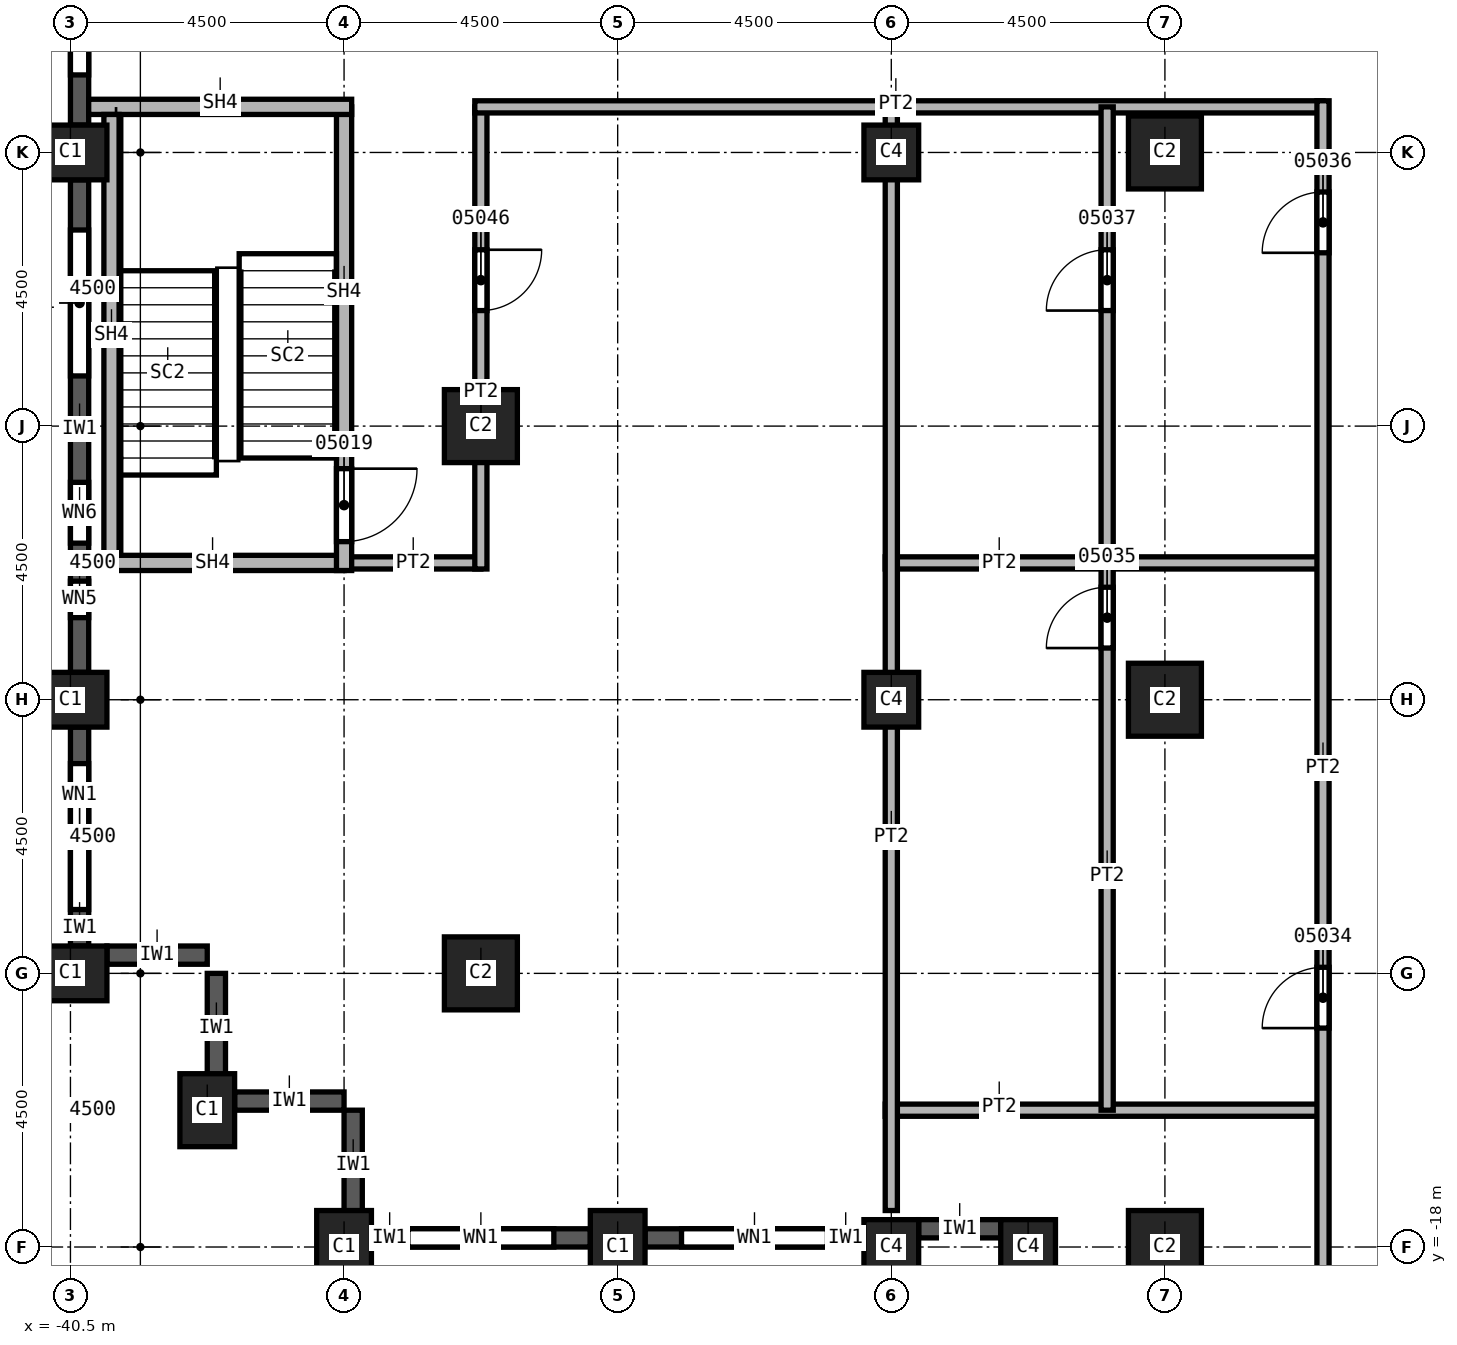
"""IFC4 building model, lengths in metres.
Left out: names, types, materials, properties, quantities, classifications, styles, units other than length and angle.
Written with IfcOpenShell. Run it as: python <this file> out.ifc"""

import sys

from ifc_helpers import new_model, si_unit, direction, frame, frame_2d, origin, origin_2d, place, context, subcontext, project, spatial, rectangle, extrude, element, fill, save


model = new_model("IFC4")
c1 = context("Model", 3, precision=1e-05, world=origin(), true_north=direction((0.0, 1.0)))
c2 = subcontext(c1, "Body", "Model", "MODEL_VIEW")
j1 = project(units=[si_unit("LENGTHUNIT", "METRE"), si_unit("PLANEANGLEUNIT", "RADIAN")], contexts=[c1])
p1 = place(None, origin())
s1 = spatial("IfcSite", under=j1, at=p1, CompositionType="ELEMENT")
p2 = place(p1, origin())
s2 = spatial("IfcBuilding", under=s1, at=p2, CompositionType="ELEMENT")
p3 = place(p2, frame((0.0, 0.0, 116.0)))
s3 = spatial("IfcBuildingStorey", under=s2, at=p3, CompositionType="ELEMENT", Elevation=116.0)
for number, where, z_axis, x_axis in (
    (1, (-40.5, 0.0, 0.0), (0.0, 0.0, 1.0), (0.0, 1.0, 0.0)),
    (2, (-40.5, -9.0, 0.0), (0.0, 0.0, 1.0), (0.0, 1.0, 0.0)),
    (3, (-40.5, -13.5, 0.0), (0.0, 0.0, 1.0), (0.0, 1.0, 0.0)),
    (4, (-38.25, -15.75, 0.0), (0.0, 0.0, 1.0), (1.0, 0.0, 0.0)),
    (5, (-31.5, -18.0, 0.0), (0.0, 0.0, 1.0), (1.0, 0.0, 0.0)),
    (6, (-36.0, -18.0, 0.0), (0.0, 0.0, 1.0), (1.0, 0.0, 0.0)),
):
    element("IfcColumn", number, at=place(p3, frame(where, z_axis=z_axis, x_axis=x_axis)), inside=s3, PredefinedType="COLUMN", context=c2, shape_type="SweptSolid", body=[
        extrude(rectangle(XDim=0.9, YDim=1.2, at=origin_2d()), origin(), (0.0, 0.0, 1.0), 3.6),
    ])
for number, where, z_axis, x_axis in (
    (7, (-33.75, -4.5, 0.0), (0.0, 0.0, 1.0), (1.0, 0.0, 0.0)),
    (8, (-33.75, -13.5, 0.0), (0.0, 0.0, 1.0), (1.0, 0.0, 0.0)),
    (9, (-22.5, 0.0, 0.0), (0.0, 0.0, 1.0), (1.0, 0.0, 0.0)),
    (10, (-22.5, -9.0, 0.0), (0.0, 0.0, 1.0), (1.0, 0.0, 0.0)),
    (11, (-22.5, -18.0, 0.0), (0.0, 0.0, 1.0), (1.0, 0.0, 0.0)),
):
    element("IfcColumn", number, at=place(p3, frame(where, z_axis=z_axis, x_axis=x_axis)), inside=s3, PredefinedType="COLUMN", context=c2, shape_type="SweptSolid", body=[
        extrude(rectangle(XDim=1.2, YDim=1.2, at=origin_2d()), origin(), (0.0, 0.0, 1.0), 3.6),
    ])
for number, where, z_axis, x_axis in (
    (12, (-27.0, 0.0, 0.0), (0.0, 0.0, 1.0), (1.0, 0.0, 0.0)),
    (13, (-27.0, -9.0, 0.0), (0.0, 0.0, 1.0), (1.0, 0.0, 0.0)),
    (14, (-27.0, -18.0, 0.0), (0.0, 0.0, 1.0), (1.0, 0.0, 0.0)),
    (15, (-24.75, -18.0, 0.0), (0.0, 0.0, 1.0), (1.0, 0.0, 0.0)),
):
    element("IfcColumn", number, at=place(p3, frame(where, z_axis=z_axis, x_axis=x_axis)), inside=s3, PredefinedType="COLUMN", context=c2, shape_type="SweptSolid", body=[
        extrude(rectangle(XDim=0.9, YDim=0.9, at=origin_2d()), origin(), (0.0, 0.0, 1.0), 3.6),
    ])
p4 = place(p3, frame((-39.9, -13.2, 0.0), z_axis=(0.0, 0.0, 1.0), x_axis=(1.0, 0.0, 0.0)))
e16 = element("IfcWall", 16, at=p4, inside=s3, PredefinedType="SOLIDWALL", context=c2, shape_type="SweptSolid", body=[
    extrude(rectangle(XDim=1.65, YDim=0.3, at=frame_2d((0.825, 0.0))), origin(), (0.0, 0.0, 1.0), 3.0),
])
for number, where, z_axis, x_axis in (
    (17, (-38.1, -15.3, 0.0), (0.0, 0.0, 1.0), (0.0, 1.0, 0.0)),
    (18, (-37.8, -15.6, 0.0), (0.0, 0.0, 1.0), (1.0, 0.0, 0.0)),
    (19, (-35.85, -17.55, 0.0), (0.0, 0.0, 1.0), (0.0, 1.0, 0.0)),
):
    element("IfcWall", number, at=place(p3, frame(where, z_axis=z_axis, x_axis=x_axis)), inside=s3, PredefinedType="SOLIDWALL", context=c2, shape_type="SweptSolid", body=[
        extrude(rectangle(XDim=1.8, YDim=0.3, at=frame_2d((0.9, 0.0))), origin(), (0.0, 0.0, 1.0), 3.0),
    ])
p5 = place(p3, frame((-40.35, 8.55, 0.0), z_axis=(0.0, 0.0, 1.0), x_axis=(0.0, -1.0, 0.0)))
e20 = element("IfcWall", 20, at=p5, inside=s3, PredefinedType="SOLIDWALL", context=c2, shape_type="SweptSolid", body=[
    extrude(rectangle(XDim=8.1, YDim=0.3, at=frame_2d((4.05, 0.0))), origin(), (0.0, 0.0, 1.0), 3.0),
])
p6 = place(p5, frame((0.825, 0.0, 0.8)))
e21 = element("IfcOpeningElement", 21, at=p6, cuts=e20, PredefinedType="OPENING", context=c2, shape_type="SweptSolid", body=[
    extrude(rectangle(XDim=2.4, YDim=1.95, at=frame_2d((1.2, 0.975))), frame((0.0, 0.15, 0.0), z_axis=(0.0, -1.0, 0.0), x_axis=(1.0, 0.0, 0.0)), (0.0, 0.0, 1.0), 0.3),
])
p7 = place(p5, frame((4.875, 0.0, 0.8)))
e22 = element("IfcOpeningElement", 22, at=p7, cuts=e20, PredefinedType="OPENING", context=c2, shape_type="SweptSolid", body=[
    extrude(rectangle(XDim=2.4, YDim=1.95, at=frame_2d((1.2, 0.975))), frame((0.0, 0.15, 0.0), z_axis=(0.0, -1.0, 0.0), x_axis=(1.0, 0.0, 0.0)), (0.0, 0.0, 1.0), 0.3),
])
p8 = place(p3, frame((-40.35, -0.45, 0.0), z_axis=(0.0, 0.0, 1.0), x_axis=(0.0, -1.0, 0.0)))
e23 = element("IfcWall", 23, at=p8, inside=s3, PredefinedType="SOLIDWALL", context=c2, shape_type="SweptSolid", body=[
    extrude(rectangle(XDim=8.1, YDim=0.3, at=frame_2d((4.05, 0.0))), origin(), (0.0, 0.0, 1.0), 3.0),
])
p9 = place(p8, frame((0.825, 0.0, 0.8)))
e24 = element("IfcOpeningElement", 24, at=p9, cuts=e23, PredefinedType="OPENING", context=c2, shape_type="SweptSolid", body=[
    extrude(rectangle(XDim=2.4, YDim=1.95, at=frame_2d((1.2, 0.975))), frame((0.0, 0.15, 0.0), z_axis=(0.0, -1.0, 0.0), x_axis=(1.0, 0.0, 0.0)), (0.0, 0.0, 1.0), 0.3),
])
p10 = place(p8, frame((4.975, 0.0, 0.8)))
e25 = element("IfcOpeningElement", 25, at=p10, cuts=e23, PredefinedType="OPENING", context=c2, shape_type="SweptSolid", body=[
    extrude(rectangle(XDim=1.0, YDim=1.95, at=frame_2d((0.5, 0.975))), frame((0.0, 0.15, 0.0), z_axis=(0.0, -1.0, 0.0), x_axis=(1.0, 0.0, 0.0)), (0.0, 0.0, 1.0), 0.3),
])
p11 = place(p8, frame((6.6, 0.0, 0.8)))
e26 = element("IfcOpeningElement", 26, at=p11, cuts=e23, PredefinedType="OPENING", context=c2, shape_type="SweptSolid", body=[
    extrude(rectangle(XDim=0.6, YDim=1.95, at=frame_2d((0.3, 0.975))), frame((0.0, 0.15, 0.0), z_axis=(0.0, -1.0, 0.0), x_axis=(1.0, 0.0, 0.0)), (0.0, 0.0, 1.0), 0.3),
])
p12 = place(p3, frame((-40.35, -9.45, 0.0), z_axis=(0.0, 0.0, 1.0), x_axis=(0.0, -1.0, 0.0)))
e27 = element("IfcWall", 27, at=p12, inside=s3, PredefinedType="SOLIDWALL", context=c2, shape_type="SweptSolid", body=[
    extrude(rectangle(XDim=3.6, YDim=0.3, at=frame_2d((1.8, 0.0))), origin(), (0.0, 0.0, 1.0), 3.0),
])
p13 = place(p12, frame((0.6, 0.0, 0.8)))
e28 = element("IfcOpeningElement", 28, at=p13, cuts=e27, PredefinedType="OPENING", context=c2, shape_type="SweptSolid", body=[
    extrude(rectangle(XDim=2.4, YDim=1.95, at=frame_2d((1.2, 0.975))), frame((0.0, 0.15, 0.0), z_axis=(0.0, -1.0, 0.0), x_axis=(1.0, 0.0, 0.0)), (0.0, 0.0, 1.0), 0.3),
])
p14 = place(p3, frame((-35.55, -17.85, 0.0), z_axis=(0.0, 0.0, 1.0), x_axis=(1.0, 0.0, 0.0)))
e29 = element("IfcWall", 29, at=p14, inside=s3, PredefinedType="SOLIDWALL", context=c2, shape_type="SweptSolid", body=[
    extrude(rectangle(XDim=3.6, YDim=0.3, at=frame_2d((1.8, 0.0))), origin(), (0.0, 0.0, 1.0), 3.0),
])
p15 = place(p14, frame((0.6, 0.0, 0.8)))
e30 = element("IfcOpeningElement", 30, at=p15, cuts=e29, PredefinedType="OPENING", context=c2, shape_type="SweptSolid", body=[
    extrude(rectangle(XDim=2.4, YDim=1.95, at=frame_2d((1.2, 0.975))), frame((0.0, 0.15, 0.0), z_axis=(0.0, -1.0, 0.0), x_axis=(1.0, 0.0, 0.0)), (0.0, 0.0, 1.0), 0.3),
])
p16 = place(p3, frame((-31.05, -17.85, 0.0), z_axis=(0.0, 0.0, 1.0), x_axis=(1.0, 0.0, 0.0)))
e31 = element("IfcWall", 31, at=p16, inside=s3, PredefinedType="SOLIDWALL", context=c2, shape_type="SweptSolid", body=[
    extrude(rectangle(XDim=3.6, YDim=0.3, at=frame_2d((1.8, 0.0))), origin(), (0.0, 0.0, 1.0), 3.0),
])
p17 = place(p16, frame((0.6, 0.0, 0.8)))
e32 = element("IfcOpeningElement", 32, at=p17, cuts=e31, PredefinedType="OPENING", context=c2, shape_type="SweptSolid", body=[
    extrude(rectangle(XDim=2.4, YDim=1.95, at=frame_2d((1.2, 0.975))), frame((0.0, 0.15, 0.0), z_axis=(0.0, -1.0, 0.0), x_axis=(1.0, 0.0, 0.0)), (0.0, 0.0, 1.0), 0.3),
])
p18 = place(p3, frame((-26.55, -17.7, 0.0), z_axis=(0.0, 0.0, 1.0), x_axis=(1.0, 0.0, 0.0)))
e33 = element("IfcWall", 33, at=p18, inside=s3, PredefinedType="SOLIDWALL", context=c2, shape_type="SweptSolid", body=[
    extrude(rectangle(XDim=1.35, YDim=0.3, at=frame_2d((0.675, 0.0))), origin(), (0.0, 0.0, 1.0), 3.0),
])
p19 = place(p3, frame((-33.75, -6.75, 0.0), z_axis=(0.0, 0.0, 1.0), x_axis=(-1.0, 0.0, 0.0)))
e34 = element("IfcWall", 34, at=p19, inside=s3, PredefinedType="PARTITIONING", context=c2, shape_type="SweptSolid", body=[
    extrude(rectangle(XDim=2.25, YDim=0.2, at=frame_2d((1.125, 0.0))), origin(), (0.0, 0.0, 1.0), 3.6),
])
p20 = place(p3, frame((-33.75, 0.75, 0.0), z_axis=(0.0, 0.0, 1.0), x_axis=(0.0, -1.0, 0.0)))
e35 = element("IfcWall", 35, at=p20, inside=s3, PredefinedType="PARTITIONING", context=c2, shape_type="SweptSolid", body=[
    extrude(rectangle(XDim=7.6, YDim=0.2, at=frame_2d((3.8, 0.0))), origin(), (0.0, 0.0, 1.0), 3.6),
])
p21 = place(p20, frame((2.35, 0.0, 0.0)))
e36 = element("IfcOpeningElement", 36, at=p21, cuts=e35, PredefinedType="OPENING", context=c2, shape_type="SweptSolid", body=[
    extrude(rectangle(XDim=1.0, YDim=2.1, at=frame_2d((0.5, 1.05))), frame((0.0, 0.1, 0.0), z_axis=(0.0, -1.0, 0.0), x_axis=(1.0, 0.0, 0.0)), (0.0, 0.0, 1.0), 0.2),
])
for number, where, z_axis, x_axis in (
    (37, (-27.1, -15.75, 0.0), (0.0, 0.0, 1.0), (1.0, 0.0, 0.0)),
    (38, (-27.1, -6.75, 0.0), (0.0, 0.0, 1.0), (1.0, 0.0, 0.0)),
):
    element("IfcWall", number, at=place(p3, frame(where, z_axis=z_axis, x_axis=x_axis)), inside=s3, PredefinedType="PARTITIONING", context=c2, shape_type="SweptSolid", body=[
        extrude(rectangle(XDim=7.2, YDim=0.2, at=frame_2d((3.6, 0.0))), origin(), (0.0, 0.0, 1.0), 3.6),
    ])
p22 = place(p3, frame((-27.0, -17.4, 0.0), z_axis=(0.0, 0.0, 1.0), x_axis=(0.0, 1.0, 0.0)))
e39 = element("IfcWall", 39, at=p22, inside=s3, PredefinedType="PARTITIONING", context=c2, shape_type="SweptSolid", body=[
    extrude(rectangle(XDim=18.15, YDim=0.2, at=frame_2d((9.075, 0.0))), origin(), (0.0, 0.0, 1.0), 3.6),
])
p23 = place(p3, frame((-19.9, 0.75, 0.0), z_axis=(0.0, 0.0, 1.0), x_axis=(-1.0, 0.0, 0.0)))
e40 = element("IfcWall", 40, at=p23, inside=s3, PredefinedType="PARTITIONING", context=c2, shape_type="SweptSolid", body=[
    extrude(rectangle(XDim=13.95, YDim=0.2, at=frame_2d((6.975, 0.0))), origin(), (0.0, 0.0, 1.0), 3.6),
])
p24 = place(p3, frame((-23.45, -15.75, 0.0), z_axis=(0.0, 0.0, 1.0), x_axis=(0.0, 1.0, 0.0)))
e41 = element("IfcWall", 41, at=p24, inside=s3, PredefinedType="PARTITIONING", context=c2, shape_type="SweptSolid", body=[
    extrude(rectangle(XDim=16.5, YDim=0.2, at=frame_2d((8.25, 0.0))), origin(), (0.0, 0.0, 1.0), 3.6),
])
p25 = place(p24, frame((7.6, 0.0, 0.0)))
e42 = element("IfcOpeningElement", 42, at=p25, cuts=e41, PredefinedType="OPENING", context=c2, shape_type="SweptSolid", body=[
    extrude(rectangle(XDim=1.0, YDim=2.1, at=frame_2d((0.5, 1.05))), frame((0.0, 0.1, 0.0), z_axis=(0.0, -1.0, 0.0), x_axis=(1.0, 0.0, 0.0)), (0.0, 0.0, 1.0), 0.2),
])
p26 = place(p24, frame((13.15, 0.0, 0.0)))
e43 = element("IfcOpeningElement", 43, at=p26, cuts=e41, PredefinedType="OPENING", context=c2, shape_type="SweptSolid", body=[
    extrude(rectangle(XDim=1.0, YDim=2.1, at=frame_2d((0.5, 1.05))), frame((0.0, 0.1, 0.0), z_axis=(0.0, -1.0, 0.0), x_axis=(1.0, 0.0, 0.0)), (0.0, 0.0, 1.0), 0.2),
])
p27 = place(p3, frame((-19.9, -24.5, 0.0), z_axis=(0.0, 0.0, 1.0), x_axis=(0.0, 1.0, 0.0)))
e44 = element("IfcWall", 44, at=p27, inside=s3, PredefinedType="PARTITIONING", context=c2, shape_type="SweptSolid", body=[
    extrude(rectangle(XDim=25.35, YDim=0.2, at=frame_2d((12.675, 0.0))), origin(), (0.0, 0.0, 1.0), 3.6),
])
p28 = place(p27, frame((2.05, 0.0, 0.0)))
e45 = element("IfcOpeningElement", 45, at=p28, cuts=e44, PredefinedType="OPENING", context=c2, shape_type="SweptSolid", body=[
    extrude(rectangle(XDim=1.0, YDim=2.1, at=frame_2d((0.5, 1.05))), frame((0.0, 0.1, 0.0), z_axis=(0.0, -1.0, 0.0), x_axis=(1.0, 0.0, 0.0)), (0.0, 0.0, 1.0), 0.2),
])
p29 = place(p27, frame((10.1, 0.0, 0.0)))
e46 = element("IfcOpeningElement", 46, at=p29, cuts=e44, PredefinedType="OPENING", context=c2, shape_type="SweptSolid", body=[
    extrude(rectangle(XDim=1.0, YDim=2.1, at=frame_2d((0.5, 1.05))), frame((0.0, 0.1, 0.0), z_axis=(0.0, -1.0, 0.0), x_axis=(1.0, 0.0, 0.0)), (0.0, 0.0, 1.0), 0.2),
])
p30 = place(p27, frame((22.85, 0.0, 0.0)))
e47 = element("IfcOpeningElement", 47, at=p30, cuts=e44, PredefinedType="OPENING", context=c2, shape_type="SweptSolid", body=[
    extrude(rectangle(XDim=1.0, YDim=2.1, at=frame_2d((0.5, 1.05))), frame((0.0, 0.1, 0.0), z_axis=(0.0, -1.0, 0.0), x_axis=(1.0, 0.0, 0.0)), (0.0, 0.0, 1.0), 0.2),
])
p31 = place(p3, frame((-36.0, -6.75, 0.0), z_axis=(0.0, 0.0, 1.0), x_axis=(-1.0, 0.0, 0.0)))
e48 = element("IfcWall", 48, at=p31, inside=s3, PredefinedType="SOLIDWALL", context=c2, shape_type="SweptSolid", body=[
    extrude(rectangle(XDim=4.2, YDim=0.25, at=frame_2d((2.1, 0.0))), origin(), (0.0, 0.0, 1.0), 3.6),
])
p32 = place(p3, frame((-36.0, 0.75, 0.0), z_axis=(0.0, 0.0, 1.0), x_axis=(0.0, -1.0, 0.0)))
e49 = element("IfcWall", 49, at=p32, inside=s3, PredefinedType="SOLIDWALL", context=c2, shape_type="SweptSolid", body=[
    extrude(rectangle(XDim=7.625, YDim=0.25, at=frame_2d((3.812, 0.0))), origin(), (0.0, 0.0, 1.0), 3.6),
])
p33 = place(p32, frame((5.95, 0.0, 0.0)))
e50 = element("IfcOpeningElement", 50, at=p33, cuts=e49, PredefinedType="OPENING", context=c2, shape_type="SweptSolid", body=[
    extrude(rectangle(XDim=1.2, YDim=2.1, at=frame_2d((0.6, 1.05))), frame((0.0, 0.125, 0.0), z_axis=(0.0, -1.0, 0.0), x_axis=(1.0, 0.0, 0.0)), (0.0, 0.0, 1.0), 0.25),
])
p34 = place(p3, frame((-35.875, 0.75, 0.0), z_axis=(0.0, 0.0, 1.0), x_axis=(-1.0, 0.0, 0.0)))
e51 = element("IfcWall", 51, at=p34, inside=s3, PredefinedType="SOLIDWALL", context=c2, shape_type="SweptSolid", body=[
    extrude(rectangle(XDim=4.325, YDim=0.25, at=frame_2d((2.163, 0.0))), origin(), (0.0, 0.0, 1.0), 3.6),
])
p35 = place(p3, frame((-39.825, -6.625, 0.0), z_axis=(0.0, 0.0, 1.0), x_axis=(0.0, 1.0, 0.0)))
e52 = element("IfcWall", 52, at=p35, inside=s3, PredefinedType="SOLIDWALL", context=c2, shape_type="SweptSolid", body=[
    extrude(rectangle(XDim=7.25, YDim=0.25, at=frame_2d((3.625, 0.0))), origin(), (0.0, 0.0, 1.0), 3.6),
])
p36 = place(p7, origin())
e53 = element("IfcWindow", 53, at=p36, inside=s3, PartitioningType="SINGLE_PANEL", PredefinedType="WINDOW", context=c2, shape_type="SweptSolid", body=[
    extrude(rectangle(XDim=2.4, YDim=1.95, at=frame_2d((1.2, 0.975))), frame((0.0, 0.03, 0.0), z_axis=(0.0, -1.0, 0.0), x_axis=(1.0, 0.0, 0.0)), (0.0, 0.0, 1.0), 0.06),
])
fill(e22, e53)
p37 = place(p9, origin())
e54 = element("IfcWindow", 54, at=p37, inside=s3, PartitioningType="SINGLE_PANEL", PredefinedType="WINDOW", context=c2, shape_type="SweptSolid", body=[
    extrude(rectangle(XDim=2.4, YDim=1.95, at=frame_2d((1.2, 0.975))), frame((0.0, 0.03, 0.0), z_axis=(0.0, -1.0, 0.0), x_axis=(1.0, 0.0, 0.0)), (0.0, 0.0, 1.0), 0.06),
])
fill(e24, e54)
p38 = place(p13, origin())
e55 = element("IfcWindow", 55, at=p38, inside=s3, PartitioningType="SINGLE_PANEL", PredefinedType="WINDOW", context=c2, shape_type="SweptSolid", body=[
    extrude(rectangle(XDim=2.4, YDim=1.95, at=frame_2d((1.2, 0.975))), frame((0.0, 0.03, 0.0), z_axis=(0.0, -1.0, 0.0), x_axis=(1.0, 0.0, 0.0)), (0.0, 0.0, 1.0), 0.06),
])
fill(e28, e55)
p39 = place(p15, origin())
e56 = element("IfcWindow", 56, at=p39, inside=s3, PartitioningType="SINGLE_PANEL", PredefinedType="WINDOW", context=c2, shape_type="SweptSolid", body=[
    extrude(rectangle(XDim=2.4, YDim=1.95, at=frame_2d((1.2, 0.975))), frame((0.0, 0.03, 0.0), z_axis=(0.0, -1.0, 0.0), x_axis=(1.0, 0.0, 0.0)), (0.0, 0.0, 1.0), 0.06),
])
fill(e30, e56)
p40 = place(p17, origin())
e57 = element("IfcWindow", 57, at=p40, inside=s3, PartitioningType="SINGLE_PANEL", PredefinedType="WINDOW", context=c2, shape_type="SweptSolid", body=[
    extrude(rectangle(XDim=2.4, YDim=1.95, at=frame_2d((1.2, 0.975))), frame((0.0, 0.03, 0.0), z_axis=(0.0, -1.0, 0.0), x_axis=(1.0, 0.0, 0.0)), (0.0, 0.0, 1.0), 0.06),
])
fill(e32, e57)
p41 = place(p33, origin())
e58 = element("IfcDoor", 58, at=p41, inside=s3, OperationType="SINGLE_SWING_RIGHT", PredefinedType="DOOR", context=c2, shape_type="SweptSolid", body=[
    extrude(rectangle(XDim=1.2, YDim=2.1, at=frame_2d((0.6, 1.05))), frame((0.0, 0.025, 0.0), z_axis=(0.0, -1.0, 0.0), x_axis=(1.0, 0.0, 0.0)), (0.0, 0.0, 1.0), 0.05),
])
fill(e50, e58)
p42 = place(p29, origin())
e59 = element("IfcDoor", 59, at=p42, inside=s3, OperationType="SINGLE_SWING_LEFT", PredefinedType="DOOR", context=c2, shape_type="SweptSolid", body=[
    extrude(rectangle(XDim=1.0, YDim=2.1, at=frame_2d((0.5, 1.05))), frame((0.0, 0.025, 0.0), z_axis=(0.0, -1.0, 0.0), x_axis=(1.0, 0.0, 0.0)), (0.0, 0.0, 1.0), 0.05),
])
fill(e46, e59)
p43 = place(p25, origin())
e60 = element("IfcDoor", 60, at=p43, inside=s3, OperationType="SINGLE_SWING_RIGHT", PredefinedType="DOOR", context=c2, shape_type="SweptSolid", body=[
    extrude(rectangle(XDim=1.0, YDim=2.1, at=frame_2d((0.5, 1.05))), frame((0.0, 0.025, 0.0), z_axis=(0.0, -1.0, 0.0), x_axis=(1.0, 0.0, 0.0)), (0.0, 0.0, 1.0), 0.05),
])
fill(e42, e60)
p44 = place(p30, origin())
e61 = element("IfcDoor", 61, at=p44, inside=s3, OperationType="SINGLE_SWING_LEFT", PredefinedType="DOOR", context=c2, shape_type="SweptSolid", body=[
    extrude(rectangle(XDim=1.0, YDim=2.1, at=frame_2d((0.5, 1.05))), frame((0.0, 0.025, 0.0), z_axis=(0.0, -1.0, 0.0), x_axis=(1.0, 0.0, 0.0)), (0.0, 0.0, 1.0), 0.05),
])
fill(e47, e61)
p45 = place(p26, origin())
e62 = element("IfcDoor", 62, at=p45, inside=s3, OperationType="SINGLE_SWING_RIGHT", PredefinedType="DOOR", context=c2, shape_type="SweptSolid", body=[
    extrude(rectangle(XDim=1.0, YDim=2.1, at=frame_2d((0.5, 1.05))), frame((0.0, 0.025, 0.0), z_axis=(0.0, -1.0, 0.0), x_axis=(1.0, 0.0, 0.0)), (0.0, 0.0, 1.0), 0.05),
])
fill(e43, e62)
p46 = place(p21, origin())
e63 = element("IfcDoor", 63, at=p46, inside=s3, OperationType="SINGLE_SWING_LEFT", PredefinedType="DOOR", context=c2, shape_type="SweptSolid", body=[
    extrude(rectangle(XDim=1.0, YDim=2.1, at=frame_2d((0.5, 1.05))), frame((0.0, 0.025, 0.0), z_axis=(0.0, -1.0, 0.0), x_axis=(1.0, 0.0, 0.0)), (0.0, 0.0, 1.0), 0.05),
])
fill(e36, e63)
p47 = place(p10, origin())
e64 = element("IfcWindow", 64, at=p47, inside=s3, PartitioningType="SINGLE_PANEL", PredefinedType="WINDOW", context=c2, shape_type="SweptSolid", body=[
    extrude(rectangle(XDim=1.0, YDim=1.95, at=frame_2d((0.5, 0.975))), frame((0.0, 0.03, 0.0), z_axis=(0.0, -1.0, 0.0), x_axis=(1.0, 0.0, 0.0)), (0.0, 0.0, 1.0), 0.06),
])
fill(e25, e64)
p48 = place(p11, origin())
e65 = element("IfcWindow", 65, at=p48, inside=s3, PartitioningType="SINGLE_PANEL", PredefinedType="WINDOW", context=c2, shape_type="SweptSolid", body=[
    extrude(rectangle(XDim=0.6, YDim=1.95, at=frame_2d((0.3, 0.975))), frame((0.0, 0.03, 0.0), z_axis=(0.0, -1.0, 0.0), x_axis=(1.0, 0.0, 0.0)), (0.0, 0.0, 1.0), 0.06),
])
fill(e26, e65)
save(model, sys.argv[1])
